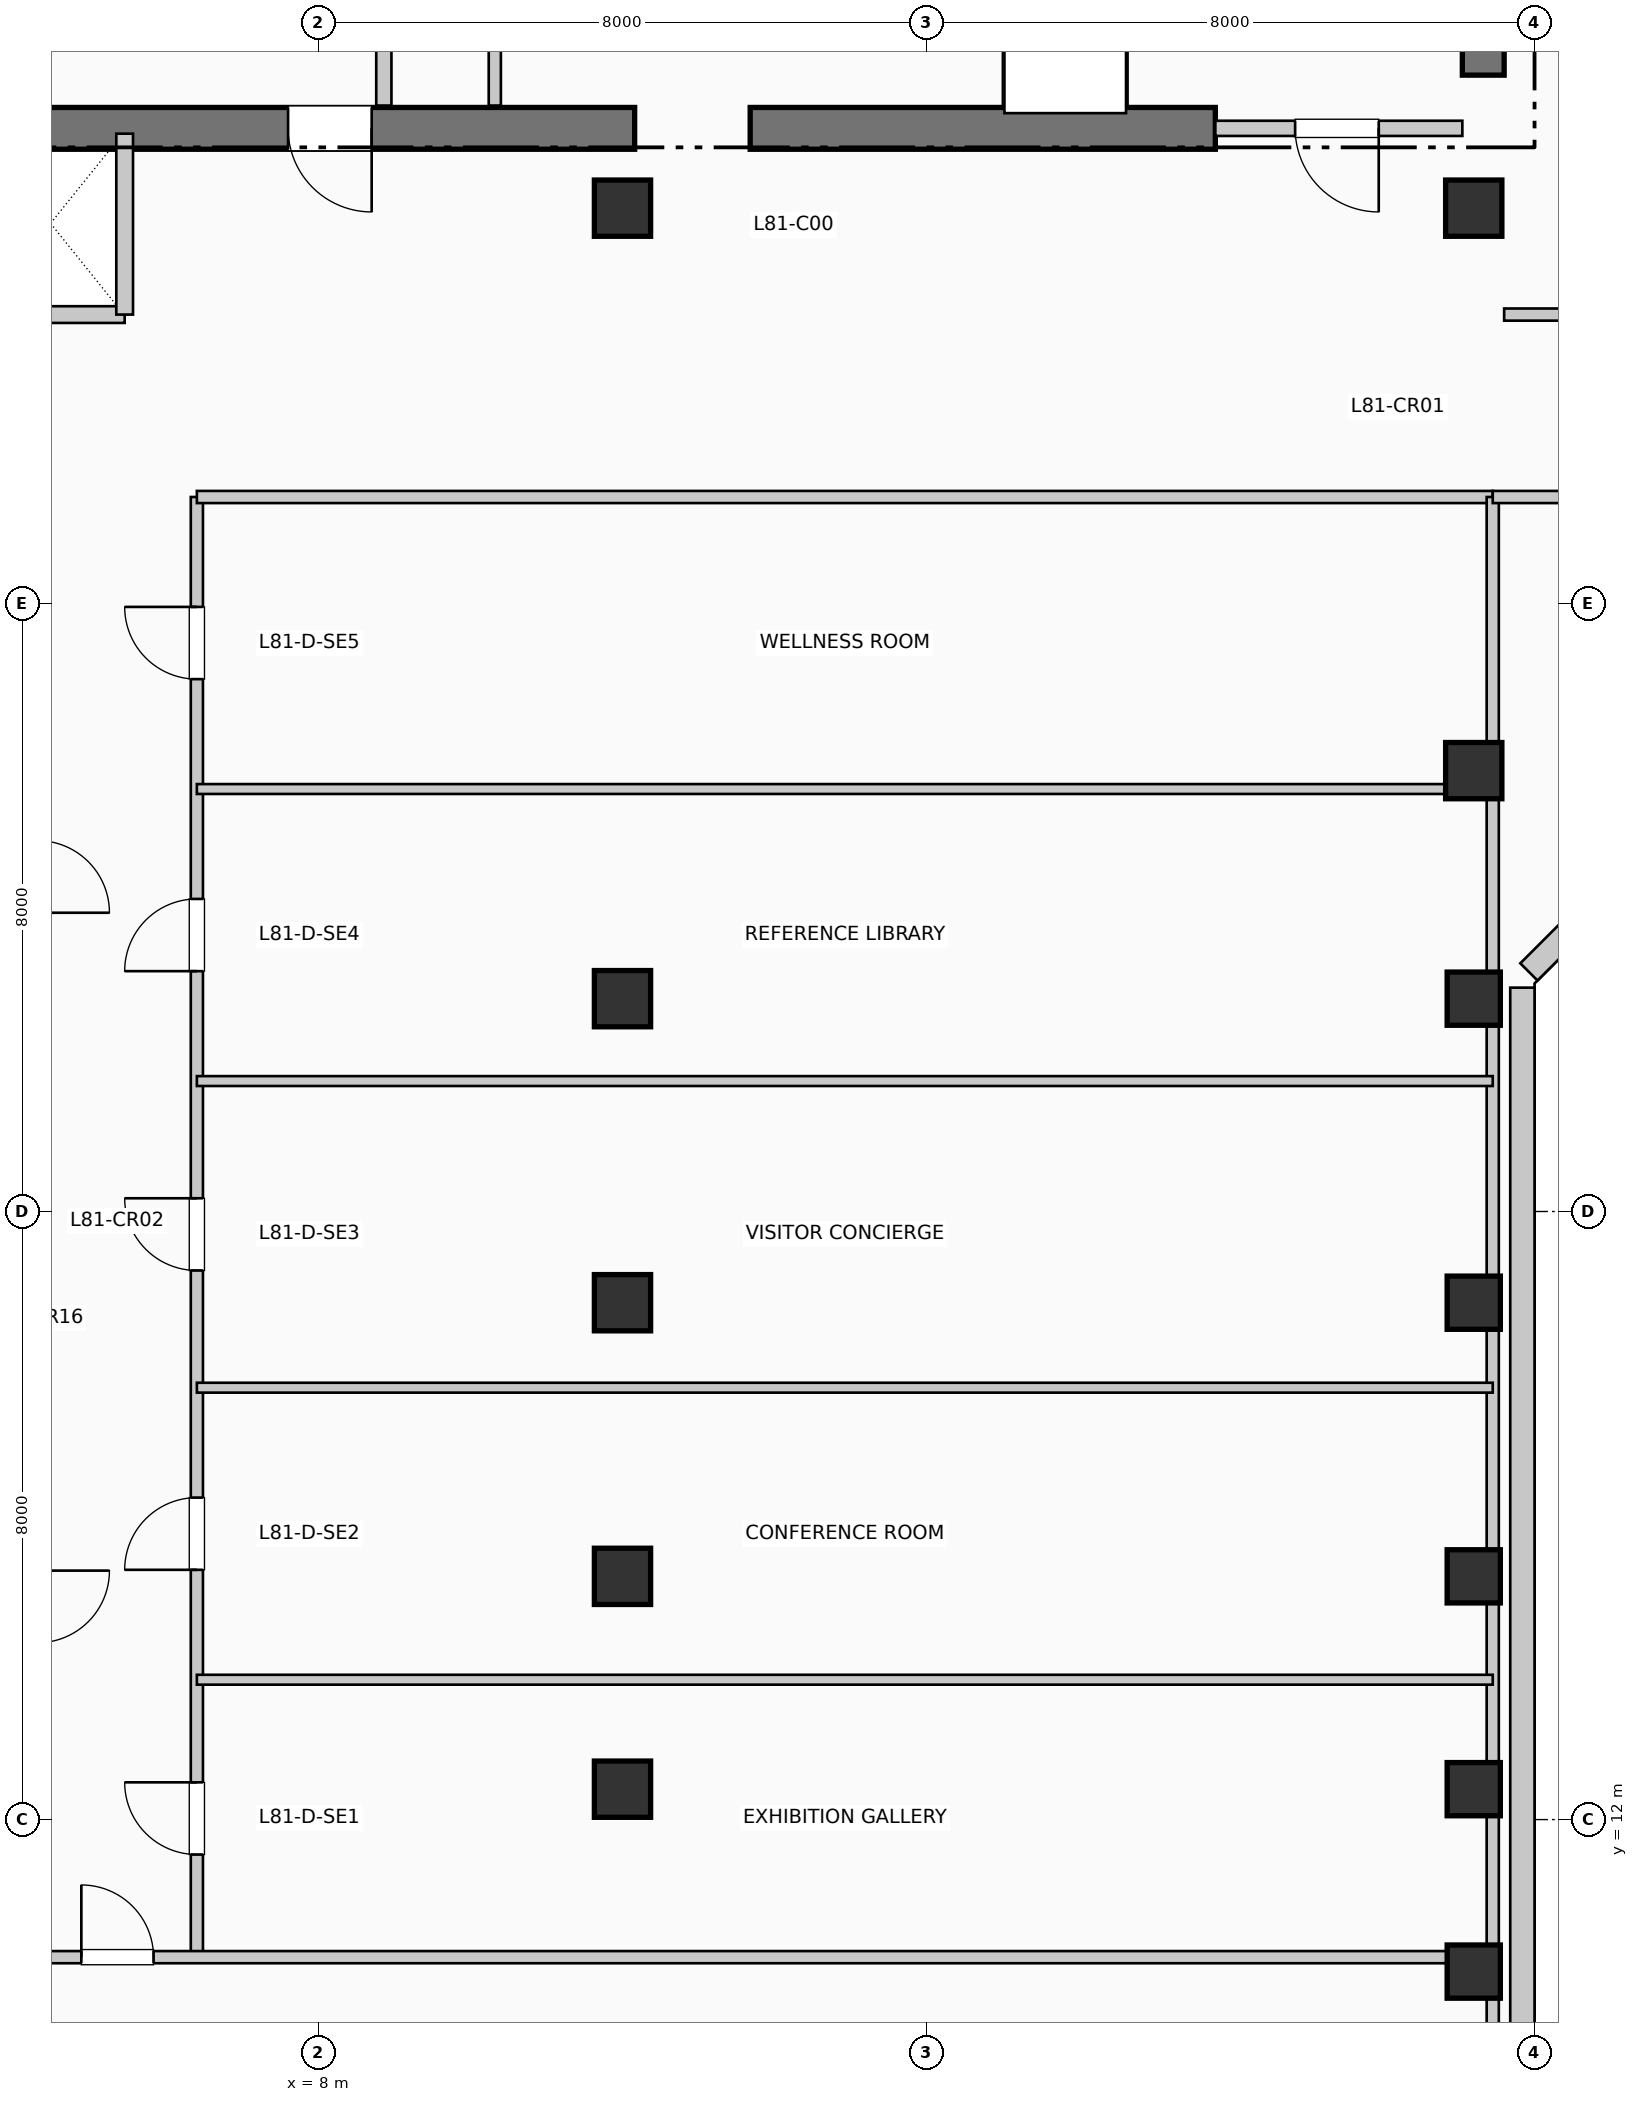
"""IFC4 building model, lengths in metres.
Left out: names, types, materials, properties, quantities, classifications, styles, units other than length and angle.
Written with IfcOpenShell. Run it as: python <this file> out.ifc"""

import sys

from ifc_helpers import new_model, si_unit, direction, frame, frame_2d, origin, origin_2d, place, context, subcontext, project, spatial, rectangle, extrude, element, fill, save


model = new_model("IFC4")
c1 = context("Model", 3, precision=1e-05, world=origin(), true_north=direction((0.0, 1.0)))
c2 = subcontext(c1, "Body", "Model", "MODEL_VIEW")
j1 = project(units=[si_unit("LENGTHUNIT", "METRE"), si_unit("PLANEANGLEUNIT", "RADIAN")], contexts=[c1])
p1 = place(None, origin())
s1 = spatial("IfcSite", under=j1, at=p1, CompositionType="ELEMENT")
p2 = place(p1, origin())
s2 = spatial("IfcBuilding", under=s1, at=p2, CompositionType="ELEMENT")
p3 = place(p2, frame((0.0, 0.0, 331.65)))
s3 = spatial("IfcBuildingStorey", under=s2, at=p3, CompositionType="ELEMENT", Elevation=331.65)
p4 = place(p3, frame((23.325, 34.95, 0.0), z_axis=(0.0, 0.0, 1.0), x_axis=(0.0, 1.0, 0.0)))
e1 = element("IfcWall", 1, at=p4, inside=s3, PredefinedType="SHEAR", context=c2, shape_type="SweptSolid", body=[
    extrude(rectangle(XDim=10.64, YDim=0.55, at=frame_2d((5.32, 0.0))), origin(), (0.0, 0.0, 1.0), 3.96),
])
p5 = place(p3, frame((1.45, 34.25, 0.0), z_axis=(0.0, 0.0, 1.0), x_axis=(1.0, 0.0, 0.0)))
e2 = element("IfcWall", 2, at=p5, inside=s3, PredefinedType="SHEAR", context=c2, shape_type="SweptSolid", body=[
    extrude(rectangle(XDim=10.71, YDim=0.55, at=frame_2d((5.355, 0.0))), origin(), (0.0, 0.0, 1.0), 3.96),
])
p6 = place(p5, frame((7.25, 0.0, 0.0), z_axis=(0.0, 0.0, 1.0), x_axis=(-1.0, 0.0, 0.0)))
e3 = element("IfcOpeningElement", 3, at=p6, cuts=e2, PredefinedType="OPENING", context=c2, shape_type="SweptSolid", body=[
    extrude(rectangle(XDim=1.1, YDim=2.15, at=frame_2d((0.55, 1.075))), frame((0.0, 0.285, 0.0), z_axis=(0.0, -1.0, 0.0), x_axis=(1.0, 0.0, 0.0)), (0.0, 0.0, 1.0), 0.57),
])
p7 = place(p3, frame((13.68, 34.25, 0.0), z_axis=(0.0, 0.0, 1.0), x_axis=(1.0, 0.0, 0.0)))
e4 = element("IfcWall", 4, at=p7, inside=s3, PredefinedType="SHEAR", context=c2, shape_type="SweptSolid", body=[
    extrude(rectangle(XDim=6.12, YDim=0.55, at=frame_2d((3.06, 0.0))), origin(), (0.0, 0.0, 1.0), 3.96),
])
for number, where, z_axis, x_axis in (
    (5, (12.0, 12.4, 0.0), (0.0, 0.0, 1.0), (1.0, 0.0, 0.0)),
    (6, (12.0, 15.2, 0.0), (0.0, 0.0, 1.0), (1.0, 0.0, 0.0)),
    (7, (12.0, 18.8, 0.0), (0.0, 0.0, 1.0), (1.0, 0.0, 0.0)),
    (8, (12.0, 22.8, 0.0), (0.0, 0.0, 1.0), (1.0, 0.0, 0.0)),
    (9, (12.0, 33.2, 0.0), (0.0, 0.0, 1.0), (1.0, 0.0, 0.0)),
):
    element("IfcColumn", number, at=place(p3, frame(where, z_axis=z_axis, x_axis=x_axis)), inside=s3, PredefinedType="COLUMN", context=c2, shape_type="SweptSolid", body=[
        extrude(rectangle(XDim=0.74, YDim=0.74, at=origin_2d()), origin(), (0.0, 0.0, 1.0), 3.96),
    ])
for number, where, z_axis, x_axis in (
    (10, (23.2, 10.0, 0.0), (0.0, 0.0, 1.0), (1.0, 0.0, 0.0)),
    (11, (23.2, 12.4, 0.0), (0.0, 0.0, 1.0), (1.0, 0.0, 0.0)),
    (12, (23.2, 15.2, 0.0), (0.0, 0.0, 1.0), (1.0, 0.0, 0.0)),
    (13, (23.2, 18.8, 0.0), (0.0, 0.0, 1.0), (1.0, 0.0, 0.0)),
    (14, (23.2, 22.8, 0.0), (0.0, 0.0, 1.0), (1.0, 0.0, 0.0)),
):
    element("IfcColumn", number, at=place(p3, frame(where, z_axis=z_axis, x_axis=x_axis)), inside=s3, PredefinedType="COLUMN", context=c2, shape_type="SweptSolid", body=[
        extrude(rectangle(XDim=0.7, YDim=0.7, at=origin_2d()), origin(), (0.0, 0.0, 1.0), 3.96),
    ])
for number, where, z_axis, x_axis in (
    (15, (23.2, 25.8, 0.0), (0.0, 0.0, 1.0), (1.0, 0.0, 0.0)),
    (16, (23.2, 33.2, 0.0), (0.0, 0.0, 1.0), (1.0, 0.0, 0.0)),
):
    element("IfcColumn", number, at=place(p3, frame(where, z_axis=z_axis, x_axis=x_axis)), inside=s3, PredefinedType="COLUMN", context=c2, shape_type="SweptSolid", body=[
        extrude(rectangle(XDim=0.74, YDim=0.74, at=origin_2d()), origin(), (0.0, 0.0, 1.0), 3.96),
    ])
p8 = place(p3, frame((23.84, 8.855, 0.0), z_axis=(0.0, 0.0, 1.0), x_axis=(0.0, 1.0, 0.0)))
e17 = element("IfcWall", 17, at=p8, inside=s3, PredefinedType="SOLIDWALL", context=c2, shape_type="SweptSolid", body=[
    extrude(rectangle(XDim=14.09, YDim=0.32, at=frame_2d((7.045, 0.0))), origin(), (0.0, 0.0, 1.0), 3.74),
])
p9 = place(p3, frame((23.926, 23.152, 0.0), z_axis=(0.0, 0.0, 1.0), x_axis=(0.707106781187, 0.707106781187, 0.0)))
e18 = element("IfcWall", 18, at=p9, inside=s3, PredefinedType="SOLIDWALL", context=c2, shape_type="SweptSolid", body=[
    extrude(rectangle(XDim=2.718, YDim=0.32, at=frame_2d((1.359, 0.0))), origin(), (0.0, 0.0, 1.0), 3.74),
])
p10 = place(p3, frame((8.86, 34.55, 0.0), z_axis=(0.0, 0.0, 1.0), x_axis=(0.0, 1.0, 0.0)))
e19 = element("IfcWall", 19, at=p10, inside=s3, PredefinedType="PARTITIONING", context=c2, shape_type="SweptSolid", body=[
    extrude(rectangle(XDim=2.5, YDim=0.2, at=frame_2d((1.25, 0.0))), origin(), (0.0, 0.0, 1.0), 3.74),
])
p11 = place(p3, frame((19.8, 34.25, 0.0), z_axis=(0.0, 0.0, 1.0), x_axis=(1.0, 0.0, 0.0)))
e20 = element("IfcWall", 20, at=p11, inside=s3, PredefinedType="PARTITIONING", context=c2, shape_type="SweptSolid", body=[
    extrude(rectangle(XDim=3.25, YDim=0.2, at=frame_2d((1.625, 0.0))), origin(), (0.0, 0.0, 1.0), 3.74),
])
p12 = place(p11, frame((2.15, 0.0, 0.0), z_axis=(0.0, 0.0, 1.0), x_axis=(-1.0, 0.0, 0.0)))
e21 = element("IfcOpeningElement", 21, at=p12, cuts=e20, PredefinedType="OPENING", context=c2, shape_type="SweptSolid", body=[
    extrude(rectangle(XDim=1.1, YDim=2.15, at=frame_2d((0.55, 1.075))), frame((0.0, 0.11, 0.0), z_axis=(0.0, -1.0, 0.0), x_axis=(1.0, 0.0, 0.0)), (0.0, 0.0, 1.0), 0.22),
])
p13 = place(p3, frame((1.55, 31.8, 0.0), z_axis=(0.0, 0.0, 1.0), x_axis=(1.0, 0.0, 0.0)))
e22 = element("IfcWall", 22, at=p13, inside=s3, PredefinedType="PARTITIONING", context=c2, shape_type="SweptSolid", body=[
    extrude(rectangle(XDim=3.9, YDim=0.22, at=frame_2d((1.95, 0.0))), origin(), (0.0, 0.0, 1.0), 3.74),
])
p14 = place(p3, frame((5.45, 31.8, 0.0), z_axis=(0.0, 0.0, 1.0), x_axis=(0.0, 1.0, 0.0)))
e23 = element("IfcWall", 23, at=p14, inside=s3, PredefinedType="PARTITIONING", context=c2, shape_type="SweptSolid", body=[
    extrude(rectangle(XDim=2.38, YDim=0.22, at=frame_2d((1.19, 0.0))), origin(), (0.0, 0.0, 1.0), 3.74),
])
p15 = place(p3, frame((10.32, 34.55, 0.0), z_axis=(0.0, 0.0, 1.0), x_axis=(0.0, 1.0, 0.0)))
e24 = element("IfcWall", 24, at=p15, inside=s3, PredefinedType="PARTITIONING", context=c2, shape_type="SweptSolid", body=[
    extrude(rectangle(XDim=2.15, YDim=0.16, at=frame_2d((1.075, 0.0))), origin(), (0.0, 0.0, 1.0), 3.74),
])
p16 = place(p3, frame((6.4, 10.19, 0.0), z_axis=(0.0, 0.0, 1.0), x_axis=(0.0, 1.0, 0.0)))
e25 = element("IfcWall", 25, at=p16, inside=s3, PredefinedType="PARTITIONING", context=c2, shape_type="SweptSolid", body=[
    extrude(rectangle(XDim=19.21, YDim=0.16, at=frame_2d((9.605, 0.0))), origin(), (0.0, 0.0, 1.0), 3.74),
])
p17 = place(p16, frame((1.35, 0.0, 0.0)))
e26 = element("IfcOpeningElement", 26, at=p17, cuts=e25, PredefinedType="OPENING", context=c2, shape_type="SweptSolid", body=[
    extrude(rectangle(XDim=0.95, YDim=2.15, at=frame_2d((0.475, 1.075))), frame((0.0, 0.09, 0.0), z_axis=(0.0, -1.0, 0.0), x_axis=(1.0, 0.0, 0.0)), (0.0, 0.0, 1.0), 0.18),
])
p18 = place(p16, frame((5.096, 0.0, 0.0)))
e27 = element("IfcOpeningElement", 27, at=p18, cuts=e25, PredefinedType="OPENING", context=c2, shape_type="SweptSolid", body=[
    extrude(rectangle(XDim=0.95, YDim=2.15, at=frame_2d((0.475, 1.075))), frame((0.0, 0.09, 0.0), z_axis=(0.0, -1.0, 0.0), x_axis=(1.0, 0.0, 0.0)), (0.0, 0.0, 1.0), 0.18),
])
p19 = place(p16, frame((9.034, 0.0, 0.0)))
e28 = element("IfcOpeningElement", 28, at=p19, cuts=e25, PredefinedType="OPENING", context=c2, shape_type="SweptSolid", body=[
    extrude(rectangle(XDim=0.95, YDim=2.15, at=frame_2d((0.475, 1.075))), frame((0.0, 0.09, 0.0), z_axis=(0.0, -1.0, 0.0), x_axis=(1.0, 0.0, 0.0)), (0.0, 0.0, 1.0), 0.18),
])
p20 = place(p16, frame((12.972, 0.0, 0.0)))
e29 = element("IfcOpeningElement", 29, at=p20, cuts=e25, PredefinedType="OPENING", context=c2, shape_type="SweptSolid", body=[
    extrude(rectangle(XDim=0.95, YDim=2.15, at=frame_2d((0.475, 1.075))), frame((0.0, 0.09, 0.0), z_axis=(0.0, -1.0, 0.0), x_axis=(1.0, 0.0, 0.0)), (0.0, 0.0, 1.0), 0.18),
])
p21 = place(p16, frame((16.814, 0.0, 0.0)))
e30 = element("IfcOpeningElement", 30, at=p21, cuts=e25, PredefinedType="OPENING", context=c2, shape_type="SweptSolid", body=[
    extrude(rectangle(XDim=0.95, YDim=2.15, at=frame_2d((0.475, 1.075))), frame((0.0, 0.09, 0.0), z_axis=(0.0, -1.0, 0.0), x_axis=(1.0, 0.0, 0.0)), (0.0, 0.0, 1.0), 0.18),
])
p22 = place(p3, frame((0.19, 10.19, 0.0), z_axis=(0.0, 0.0, 1.0), x_axis=(1.0, 0.0, 0.0)))
e31 = element("IfcWall", 31, at=p22, inside=s3, PredefinedType="PARTITIONING", context=c2, shape_type="SweptSolid", body=[
    extrude(rectangle(XDim=23.26, YDim=0.16, at=frame_2d((11.63, 0.0))), origin(), (0.0, 0.0, 1.0), 3.175),
])
p23 = place(p22, frame((4.69, 0.0, 0.0)))
e32 = element("IfcOpeningElement", 32, at=p23, cuts=e31, PredefinedType="OPENING", context=c2, shape_type="SweptSolid", body=[
    extrude(rectangle(XDim=0.95, YDim=2.15, at=frame_2d((0.475, 1.075))), frame((0.0, 0.09, 0.0), z_axis=(0.0, -1.0, 0.0), x_axis=(1.0, 0.0, 0.0)), (0.0, 0.0, 1.0), 0.18),
])
p24 = place(p3, frame((6.4, 29.4, 0.0), z_axis=(0.0, 0.0, 1.0), x_axis=(1.0, 0.0, 0.0)))
e33 = element("IfcWall", 33, at=p24, inside=s3, PredefinedType="PARTITIONING", context=c2, shape_type="SweptSolid", body=[
    extrude(rectangle(XDim=17.05, YDim=0.16, at=frame_2d((8.525, 0.0))), origin(), (0.0, 0.0, 1.0), 3.425),
])
p25 = place(p3, frame((23.45, 5.99, 0.0), z_axis=(0.0, 0.0, 1.0), x_axis=(0.0, 1.0, 0.0)))
e34 = element("IfcWall", 34, at=p25, inside=s3, PredefinedType="PARTITIONING", context=c2, shape_type="SweptSolid", body=[
    extrude(rectangle(XDim=23.41, YDim=0.16, at=frame_2d((11.705, 0.0))), origin(), (0.0, 0.0, 1.0), 3.175),
])
for number, where, z_axis, x_axis in (
    (35, (6.4, 13.84, 0.0), (0.0, 0.0, 1.0), (1.0, 0.0, 0.0)),
    (36, (6.4, 17.682, 0.0), (0.0, 0.0, 1.0), (1.0, 0.0, 0.0)),
    (37, (6.4, 21.716, 0.0), (0.0, 0.0, 1.0), (1.0, 0.0, 0.0)),
):
    element("IfcWall", number, at=place(p3, frame(where, z_axis=z_axis, x_axis=x_axis)), inside=s3, PredefinedType="PARTITIONING", context=c2, shape_type="SweptSolid", body=[
        extrude(rectangle(XDim=17.05, YDim=0.13, at=frame_2d((8.525, 0.0))), origin(), (0.0, 0.0, 1.0), 3.74),
    ])
p26 = place(p3, frame((6.4, 25.558, 0.0), z_axis=(0.0, 0.0, 1.0), x_axis=(1.0, 0.0, 0.0)))
e38 = element("IfcWall", 38, at=p26, inside=s3, PredefinedType="PARTITIONING", context=c2, shape_type="SweptSolid", body=[
    extrude(rectangle(XDim=17.05, YDim=0.13, at=frame_2d((8.525, 0.0))), origin(), (0.0, 0.0, 1.0), 3.175),
])
p27 = place(p3, frame((23.45, 29.4, 0.0), z_axis=(0.0, 0.0, 1.0), x_axis=(1.0, 0.0, 0.0)))
e39 = element("IfcWall", 39, at=p27, inside=s3, PredefinedType="PARTITIONING", context=c2, shape_type="SweptSolid", body=[
    extrude(rectangle(XDim=20.76, YDim=0.16, at=frame_2d((10.38, 0.0))), origin(), (0.0, 0.0, 1.0), 3.425),
])
p28 = place(p27, frame((4.108, 0.0, 0.0), z_axis=(0.0, 0.0, 1.0), x_axis=(-1.0, 0.0, 0.0)))
e40 = element("IfcOpeningElement", 40, at=p28, cuts=e39, PredefinedType="OPENING", context=c2, shape_type="SweptSolid", body=[
    extrude(rectangle(XDim=0.95, YDim=2.15, at=frame_2d((0.475, 1.075))), frame((0.0, 0.09, 0.0), z_axis=(0.0, -1.0, 0.0), x_axis=(1.0, 0.0, 0.0)), (0.0, 0.0, 1.0), 0.18),
])
p29 = place(p27, frame((11.374, 0.0, 0.0), z_axis=(0.0, 0.0, 1.0), x_axis=(-1.0, 0.0, 0.0)))
e41 = element("IfcOpeningElement", 41, at=p29, cuts=e39, PredefinedType="OPENING", context=c2, shape_type="SweptSolid", body=[
    extrude(rectangle(XDim=0.95, YDim=2.15, at=frame_2d((0.475, 1.075))), frame((0.0, 0.09, 0.0), z_axis=(0.0, -1.0, 0.0), x_axis=(1.0, 0.0, 0.0)), (0.0, 0.0, 1.0), 0.18),
])
p30 = place(p27, frame((18.121, 0.0, 0.0), z_axis=(0.0, 0.0, 1.0), x_axis=(-1.0, 0.0, 0.0)))
e42 = element("IfcOpeningElement", 42, at=p30, cuts=e39, PredefinedType="OPENING", context=c2, shape_type="SweptSolid", body=[
    extrude(rectangle(XDim=0.95, YDim=2.15, at=frame_2d((0.475, 1.075))), frame((0.0, 0.09, 0.0), z_axis=(0.0, -1.0, 0.0), x_axis=(1.0, 0.0, 0.0)), (0.0, 0.0, 1.0), 0.18),
])
p31 = place(p3, frame((23.6, 31.8, 0.0), z_axis=(0.0, 0.0, 1.0), x_axis=(1.0, 0.0, 0.0)))
e43 = element("IfcWall", 43, at=p31, inside=s3, PredefinedType="PARTITIONING", context=c2, shape_type="SweptSolid", body=[
    extrude(rectangle(XDim=20.61, YDim=0.16, at=frame_2d((10.305, 0.0))), origin(), (0.0, 0.0, 1.0), 3.74),
])
p32 = place(p31, frame((9.83, 0.0, 0.0)))
e44 = element("IfcOpeningElement", 44, at=p32, cuts=e43, PredefinedType="OPENING", context=c2, shape_type="SweptSolid", body=[
    extrude(rectangle(XDim=0.95, YDim=2.15, at=frame_2d((0.475, 1.075))), frame((0.0, 0.09, 0.0), z_axis=(0.0, -1.0, 0.0), x_axis=(1.0, 0.0, 0.0)), (0.0, 0.0, 1.0), 0.18),
])
p33 = place(p6, origin())
e45 = element("IfcDoor", 45, at=p33, inside=s3, OperationType="SINGLE_SWING_RIGHT", PredefinedType="DOOR", context=c2, shape_type="SweptSolid", body=[
    extrude(rectangle(XDim=1.1, YDim=2.15, at=frame_2d((0.55, 1.075))), frame((0.0, 0.025, 0.0), z_axis=(0.0, -1.0, 0.0), x_axis=(1.0, 0.0, 0.0)), (0.0, 0.0, 1.0), 0.05),
])
fill(e3, e45)
p34 = place(p12, origin())
e46 = element("IfcDoor", 46, at=p34, inside=s3, OperationType="SINGLE_SWING_RIGHT", PredefinedType="DOOR", context=c2, shape_type="SweptSolid", body=[
    extrude(rectangle(XDim=1.1, YDim=2.15, at=frame_2d((0.55, 1.075))), frame((0.0, 0.025, 0.0), z_axis=(0.0, -1.0, 0.0), x_axis=(1.0, 0.0, 0.0)), (0.0, 0.0, 1.0), 0.05),
])
fill(e21, e46)
p35 = place(p23, origin())
e47 = element("IfcDoor", 47, at=p35, inside=s3, OperationType="SINGLE_SWING_LEFT", PredefinedType="DOOR", context=c2, shape_type="SweptSolid", body=[
    extrude(rectangle(XDim=0.95, YDim=2.15, at=frame_2d((0.475, 1.075))), frame((0.0, 0.025, 0.0), z_axis=(0.0, -1.0, 0.0), x_axis=(1.0, 0.0, 0.0)), (0.0, 0.0, 1.0), 0.05),
])
fill(e32, e47)
p36 = place(p17, origin())
e48 = element("IfcDoor", 48, at=p36, inside=s3, OperationType="SINGLE_SWING_RIGHT", PredefinedType="DOOR", context=c2, shape_type="SweptSolid", body=[
    extrude(rectangle(XDim=0.95, YDim=2.15, at=frame_2d((0.475, 1.075))), frame((0.0, 0.025, 0.0), z_axis=(0.0, -1.0, 0.0), x_axis=(1.0, 0.0, 0.0)), (0.0, 0.0, 1.0), 0.05),
])
fill(e26, e48)
p37 = place(p18, origin())
e49 = element("IfcDoor", 49, at=p37, inside=s3, OperationType="SINGLE_SWING_LEFT", PredefinedType="DOOR", context=c2, shape_type="SweptSolid", body=[
    extrude(rectangle(XDim=0.95, YDim=2.15, at=frame_2d((0.475, 1.075))), frame((0.0, 0.025, 0.0), z_axis=(0.0, -1.0, 0.0), x_axis=(1.0, 0.0, 0.0)), (0.0, 0.0, 1.0), 0.05),
])
fill(e27, e49)
p38 = place(p19, origin())
e50 = element("IfcDoor", 50, at=p38, inside=s3, OperationType="SINGLE_SWING_RIGHT", PredefinedType="DOOR", context=c2, shape_type="SweptSolid", body=[
    extrude(rectangle(XDim=0.95, YDim=2.15, at=frame_2d((0.475, 1.075))), frame((0.0, 0.025, 0.0), z_axis=(0.0, -1.0, 0.0), x_axis=(1.0, 0.0, 0.0)), (0.0, 0.0, 1.0), 0.05),
])
fill(e28, e50)
p39 = place(p20, origin())
e51 = element("IfcDoor", 51, at=p39, inside=s3, OperationType="SINGLE_SWING_LEFT", PredefinedType="DOOR", context=c2, shape_type="SweptSolid", body=[
    extrude(rectangle(XDim=0.95, YDim=2.15, at=frame_2d((0.475, 1.075))), frame((0.0, 0.025, 0.0), z_axis=(0.0, -1.0, 0.0), x_axis=(1.0, 0.0, 0.0)), (0.0, 0.0, 1.0), 0.05),
])
fill(e29, e51)
p40 = place(p21, origin())
e52 = element("IfcDoor", 52, at=p40, inside=s3, OperationType="SINGLE_SWING_RIGHT", PredefinedType="DOOR", context=c2, shape_type="SweptSolid", body=[
    extrude(rectangle(XDim=0.95, YDim=2.15, at=frame_2d((0.475, 1.075))), frame((0.0, 0.025, 0.0), z_axis=(0.0, -1.0, 0.0), x_axis=(1.0, 0.0, 0.0)), (0.0, 0.0, 1.0), 0.05),
])
fill(e30, e52)
save(model, sys.argv[1])
